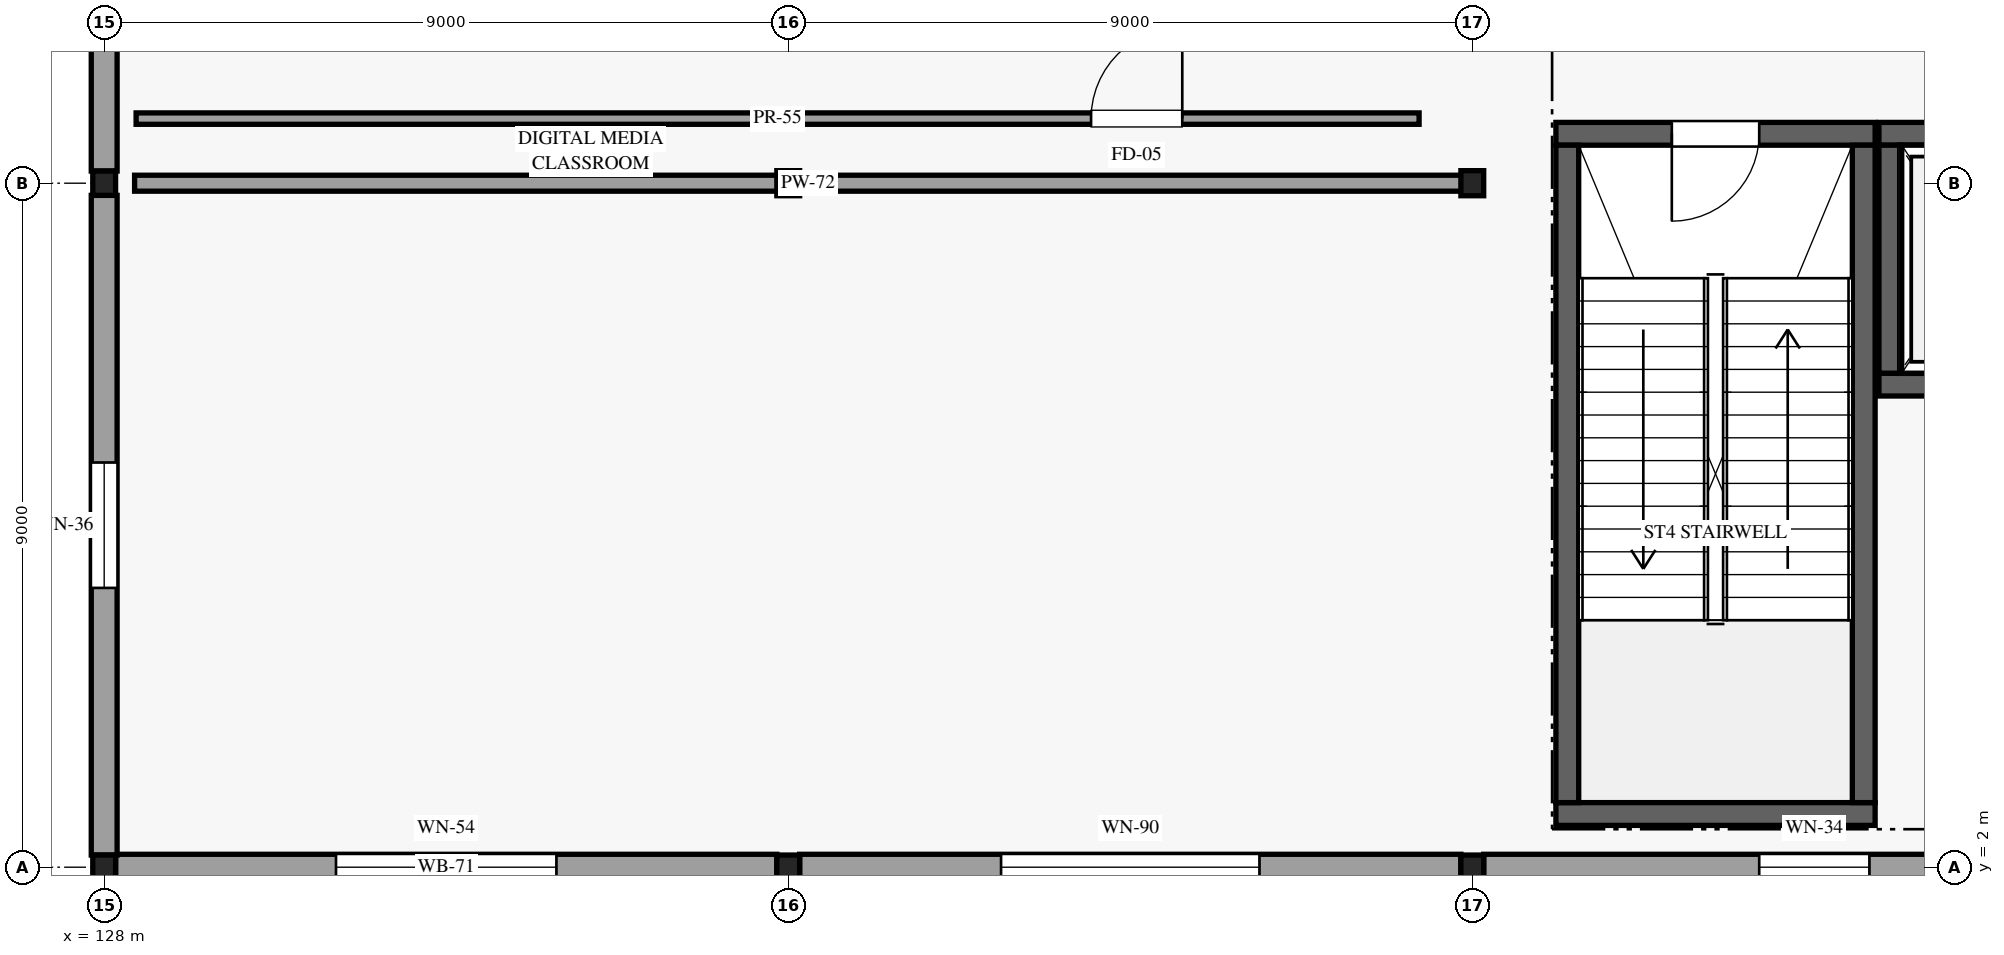
"""IFC4 building model, lengths in metres.
Left out: names, types, materials, properties, quantities, classifications, styles, units other than length and angle.
Written with IfcOpenShell. Run it as: python <this file> out.ifc"""

import sys

from ifc_helpers import new_model, si_unit, direction, frame, frame_2d, origin, origin_2d, place, context, subcontext, project, spatial, rectangle, i_section, extrude, element, fill, save


model = new_model("IFC4")
c1 = context("Model", 3, precision=1e-05, world=origin(), true_north=direction((0.0, 1.0)))
c2 = subcontext(c1, "Body", "Model", "MODEL_VIEW")
j1 = project(units=[si_unit("LENGTHUNIT", "METRE"), si_unit("PLANEANGLEUNIT", "RADIAN")], contexts=[c1])
p1 = place(None, origin())
s1 = spatial("IfcSite", under=j1, at=p1, CompositionType="ELEMENT")
p2 = place(p1, origin())
s2 = spatial("IfcBuilding", under=s1, at=p2, CompositionType="ELEMENT")
p3 = place(p2, frame((0.0, 0.0, 5.4)))
s3 = spatial("IfcBuildingStorey", under=s2, at=p3, CompositionType="ELEMENT", Elevation=5.4)
for number, where, z_axis, x_axis in (
    (1, (128.0, 2.0, 0.0), (0.0, 0.0, 1.0), (1.0, 0.0, 0.0)),
    (2, (128.0, 11.0, 0.0), (0.0, 0.0, 1.0), (1.0, 0.0, 0.0)),
    (3, (137.0, 2.0, 0.0), (0.0, 0.0, 1.0), (1.0, 0.0, 0.0)),
):
    element("IfcColumn", number, at=place(p3, frame(where, z_axis=z_axis, x_axis=x_axis)), inside=s3, PredefinedType="COLUMN", context=c2, shape_type="SweptSolid", body=[
        extrude(i_section(OverallWidth=0.3, OverallDepth=0.32, WebThickness=0.011, FlangeThickness=0.021, FilletRadius=0.027, at=origin_2d()), origin(), (0.0, 0.0, 1.0), 4.8),
    ])
p4 = place(p3, frame((137.0, 11.0, 0.0), z_axis=(0.0, 0.0, 1.0), x_axis=(1.0, 0.0, 0.0)))
e4 = element("IfcColumn", 4, at=p4, inside=s3, PredefinedType="COLUMN", context=c2, shape_type="SweptSolid", body=[
    extrude(i_section(OverallWidth=0.3, OverallDepth=0.33, WebThickness=0.01, FlangeThickness=0.017, FilletRadius=0.027, at=origin_2d()), origin(), (0.0, 0.0, 1.0), 4.8),
])
p5 = place(p3, frame((146.0, 2.0, 0.0), z_axis=(0.0, 0.0, 1.0), x_axis=(1.0, 0.0, 0.0)))
e5 = element("IfcColumn", 5, at=p5, inside=s3, PredefinedType="COLUMN", context=c2, shape_type="SweptSolid", body=[
    extrude(i_section(OverallWidth=0.3, OverallDepth=0.32, WebThickness=0.011, FlangeThickness=0.021, FilletRadius=0.027, at=origin_2d()), origin(), (0.0, 0.0, 1.0), 4.8),
])
p6 = place(p3, frame((146.0, 11.0, 0.0), z_axis=(0.0, 0.0, 1.0), x_axis=(1.0, 0.0, 0.0)))
e6 = element("IfcColumn", 6, at=p6, inside=s3, PredefinedType="COLUMN", context=c2, shape_type="SweptSolid", body=[
    extrude(i_section(OverallWidth=0.3, OverallDepth=0.33, WebThickness=0.01, FlangeThickness=0.017, FilletRadius=0.027, at=origin_2d()), origin(), (0.0, 0.0, 1.0), 4.8),
])
p7 = place(p3, frame((128.15, 2.0, 0.0), z_axis=(0.0, 0.0, 1.0), x_axis=(1.0, 0.0, 0.0)))
e7 = element("IfcWall", 7, at=p7, inside=s3, PredefinedType="STANDARD", context=c2, shape_type="SweptSolid", body=[
    extrude(rectangle(XDim=8.7, YDim=0.34, at=frame_2d((4.35, 0.0))), origin(), (0.0, 0.0, 1.0), 3.985),
])
p8 = place(p7, frame((5.8, 0.0, 0.85), z_axis=(0.0, 0.0, 1.0), x_axis=(-1.0, 0.0, 0.0)))
e8 = element("IfcOpeningElement", 8, at=p8, cuts=e7, PredefinedType="OPENING", context=c2, shape_type="SweptSolid", body=[
    extrude(rectangle(XDim=2.9, YDim=2.25, at=frame_2d((1.45, 1.125))), frame((0.0, 0.18, 0.0), z_axis=(0.0, -1.0, 0.0), x_axis=(1.0, 0.0, 0.0)), (0.0, 0.0, 1.0), 0.36),
])
p9 = place(p3, frame((137.15, 2.0, 0.0), z_axis=(0.0, 0.0, 1.0), x_axis=(1.0, 0.0, 0.0)))
e9 = element("IfcWall", 9, at=p9, inside=s3, PredefinedType="STANDARD", context=c2, shape_type="SweptSolid", body=[
    extrude(rectangle(XDim=8.7, YDim=0.34, at=frame_2d((4.35, 0.0))), origin(), (0.0, 0.0, 1.0), 3.985),
])
p10 = place(p9, frame((6.05, 0.0, 0.85), z_axis=(0.0, 0.0, 1.0), x_axis=(-1.0, 0.0, 0.0)))
e10 = element("IfcOpeningElement", 10, at=p10, cuts=e9, PredefinedType="OPENING", context=c2, shape_type="SweptSolid", body=[
    extrude(rectangle(XDim=3.4, YDim=2.4, at=frame_2d((1.7, 1.2))), frame((0.0, 0.18, 0.0), z_axis=(0.0, -1.0, 0.0), x_axis=(1.0, 0.0, 0.0)), (0.0, 0.0, 1.0), 0.36),
])
p11 = place(p3, frame((146.15, 2.0, 0.0), z_axis=(0.0, 0.0, 1.0), x_axis=(1.0, 0.0, 0.0)))
e11 = element("IfcWall", 11, at=p11, inside=s3, PredefinedType="STANDARD", context=c2, shape_type="SweptSolid", body=[
    extrude(rectangle(XDim=8.7, YDim=0.34, at=frame_2d((4.35, 0.0))), origin(), (0.0, 0.0, 1.0), 3.985),
])
p12 = place(p11, frame((5.075, 0.0, 0.85), z_axis=(0.0, 0.0, 1.0), x_axis=(-1.0, 0.0, 0.0)))
e12 = element("IfcOpeningElement", 12, at=p12, cuts=e11, PredefinedType="OPENING", context=c2, shape_type="SweptSolid", body=[
    extrude(rectangle(XDim=1.45, YDim=1.85, at=frame_2d((0.725, 0.925))), frame((0.0, 0.18, 0.0), z_axis=(0.0, -1.0, 0.0), x_axis=(1.0, 0.0, 0.0)), (0.0, 0.0, 1.0), 0.36),
])
p13 = place(p3, frame((128.0, 2.16, 0.0), z_axis=(0.0, 0.0, 1.0), x_axis=(0.0, 1.0, 0.0)))
e13 = element("IfcWall", 13, at=p13, inside=s3, PredefinedType="STANDARD", context=c2, shape_type="SweptSolid", body=[
    extrude(rectangle(XDim=8.68, YDim=0.34, at=frame_2d((4.34, 0.0))), origin(), (0.0, 0.0, 1.0), 3.985),
])
p14 = place(p13, frame((3.515, 0.0, 0.85)))
e14 = element("IfcOpeningElement", 14, at=p14, cuts=e13, PredefinedType="OPENING", context=c2, shape_type="SweptSolid", body=[
    extrude(rectangle(XDim=1.65, YDim=2.0, at=frame_2d((0.825, 1.0))), frame((0.0, 0.18, 0.0), z_axis=(0.0, -1.0, 0.0), x_axis=(1.0, 0.0, 0.0)), (0.0, 0.0, 1.0), 0.36),
])
p15 = place(p3, frame((128.0, 11.16, 0.0), z_axis=(0.0, 0.0, 1.0), x_axis=(0.0, 1.0, 0.0)))
e15 = element("IfcWall", 15, at=p15, inside=s3, PredefinedType="STANDARD", context=c2, shape_type="SweptSolid", body=[
    extrude(rectangle(XDim=8.68, YDim=0.34, at=frame_2d((4.34, 0.0))), origin(), (0.0, 0.0, 1.0), 3.985),
])
p16 = place(p15, frame((3.415, 0.0, 0.85)))
e16 = element("IfcOpeningElement", 16, at=p16, cuts=e15, PredefinedType="OPENING", context=c2, shape_type="SweptSolid", body=[
    extrude(rectangle(XDim=1.85, YDim=2.1, at=frame_2d((0.925, 1.05))), frame((0.0, 0.18, 0.0), z_axis=(0.0, -1.0, 0.0), x_axis=(1.0, 0.0, 0.0)), (0.0, 0.0, 1.0), 0.36),
])
p17 = place(p3, frame((147.1, 11.65, 0.0), z_axis=(0.0, 0.0, 1.0), x_axis=(1.0, 0.0, 0.0)))
e17 = element("IfcWall", 17, at=p17, inside=s3, PredefinedType="SHEAR", context=c2, shape_type="SweptSolid", body=[
    extrude(rectangle(XDim=4.2, YDim=0.3, at=frame_2d((2.1, 0.0))), origin(), (0.0, 0.0, 1.0), 4.56),
])
p18 = place(p17, frame((2.675, 0.0, 0.0), z_axis=(0.0, 0.0, 1.0), x_axis=(-1.0, 0.0, 0.0)))
e18 = element("IfcOpeningElement", 18, at=p18, cuts=e17, PredefinedType="OPENING", context=c2, shape_type="SweptSolid", body=[
    extrude(rectangle(XDim=1.15, YDim=2.2, at=frame_2d((0.575, 1.1))), frame((0.0, 0.16, 0.0), z_axis=(0.0, -1.0, 0.0), x_axis=(1.0, 0.0, 0.0)), (0.0, 0.0, 1.0), 0.32),
])
p19 = place(p3, frame((147.1, 2.7, 0.0), z_axis=(0.0, 0.0, 1.0), x_axis=(1.0, 0.0, 0.0)))
e19 = element("IfcWall", 19, at=p19, inside=s3, PredefinedType="SHEAR", context=c2, shape_type="SweptSolid", body=[
    extrude(rectangle(XDim=4.2, YDim=0.3, at=frame_2d((2.1, 0.0))), origin(), (0.0, 0.0, 1.0), 4.56),
])
for number, where, z_axis, x_axis in (
    (20, (147.25, 2.85, 0.0), (0.0, 0.0, 1.0), (0.0, 1.0, 0.0)),
    (21, (151.15, 2.85, 0.0), (0.0, 0.0, 1.0), (0.0, 1.0, 0.0)),
):
    element("IfcWall", number, at=place(p3, frame(where, z_axis=z_axis, x_axis=x_axis)), inside=s3, PredefinedType="SHEAR", context=c2, shape_type="SweptSolid", body=[
        extrude(rectangle(XDim=8.65, YDim=0.3, at=frame_2d((4.325, 0.0))), origin(), (0.0, 0.0, 1.0), 4.56),
    ])
p20 = place(p3, frame((151.35, 11.65, 0.0), z_axis=(0.0, 0.0, 1.0), x_axis=(1.0, 0.0, 0.0)))
e22 = element("IfcWall", 22, at=p20, inside=s3, PredefinedType="SHEAR", context=c2, shape_type="SweptSolid", body=[
    extrude(rectangle(XDim=2.6, YDim=0.3, at=frame_2d((1.3, 0.0))), origin(), (0.0, 0.0, 1.0), 4.56),
])
p21 = place(p20, frame((0.75, 0.0, 0.0)))
e23 = element("IfcOpeningElement", 23, at=p21, cuts=e22, PredefinedType="OPENING", context=c2, shape_type="SweptSolid", body=[
    extrude(rectangle(XDim=1.1, YDim=2.2, at=frame_2d((0.55, 1.1))), frame((0.0, 0.16, 0.0), z_axis=(0.0, -1.0, 0.0), x_axis=(1.0, 0.0, 0.0)), (0.0, 0.0, 1.0), 0.32),
])
p22 = place(p3, frame((151.35, 8.35, 0.0), z_axis=(0.0, 0.0, 1.0), x_axis=(1.0, 0.0, 0.0)))
e24 = element("IfcWall", 24, at=p22, inside=s3, PredefinedType="SHEAR", context=c2, shape_type="SweptSolid", body=[
    extrude(rectangle(XDim=2.6, YDim=0.3, at=frame_2d((1.3, 0.0))), origin(), (0.0, 0.0, 1.0), 4.56),
])
p23 = place(p3, frame((151.5, 8.5, 0.0), z_axis=(0.0, 0.0, 1.0), x_axis=(0.0, 1.0, 0.0)))
e25 = element("IfcWall", 25, at=p23, inside=s3, PredefinedType="SHEAR", context=c2, shape_type="SweptSolid", body=[
    extrude(rectangle(XDim=3.0, YDim=0.3, at=frame_2d((1.5, 0.0))), origin(), (0.0, 0.0, 1.0), 4.56),
])
p24 = place(p3, frame((128.4, 11.0, 0.0), z_axis=(0.0, 0.0, 1.0), x_axis=(1.0, 0.0, 0.0)))
e26 = element("IfcWall", 26, at=p24, inside=s3, PredefinedType="PARTITIONING", context=c2, shape_type="SweptSolid", body=[
    extrude(rectangle(XDim=17.72, YDim=0.21, at=frame_2d((8.86, 0.0))), origin(), (0.0, 0.0, 1.0), 3.985),
])
p25 = place(p3, frame((128.42, 11.85, 0.0), z_axis=(0.0, 0.0, 1.0), x_axis=(1.0, 0.0, 0.0)))
e27 = element("IfcWall", 27, at=p25, inside=s3, PredefinedType="PARTITIONING", context=c2, shape_type="SweptSolid", body=[
    extrude(rectangle(XDim=16.88, YDim=0.15, at=frame_2d((8.44, 0.0))), origin(), (0.0, 0.0, 1.0), 3.985),
])
p26 = place(p25, frame((12.564, 0.0, 0.0)))
e28 = element("IfcOpeningElement", 28, at=p26, cuts=e27, PredefinedType="OPENING", context=c2, shape_type="SweptSolid", body=[
    extrude(rectangle(XDim=1.2, YDim=2.3, at=frame_2d((0.6, 1.15))), frame((0.0, 0.085, 0.0), z_axis=(0.0, -1.0, 0.0), x_axis=(1.0, 0.0, 0.0)), (0.0, 0.0, 1.0), 0.17),
])
p27 = place(p8, origin())
e29 = element("IfcWindow", 29, at=p27, inside=s3, PartitioningType="SINGLE_PANEL", PredefinedType="WINDOW", context=c2, shape_type="SweptSolid", body=[
    extrude(rectangle(XDim=2.9, YDim=2.25, at=frame_2d((1.45, 1.125))), frame((0.0, 0.03, 0.0), z_axis=(0.0, -1.0, 0.0), x_axis=(1.0, 0.0, 0.0)), (0.0, 0.0, 1.0), 0.06),
])
fill(e8, e29)
p28 = place(p10, origin())
e30 = element("IfcWindow", 30, at=p28, inside=s3, PartitioningType="SINGLE_PANEL", PredefinedType="WINDOW", context=c2, shape_type="SweptSolid", body=[
    extrude(rectangle(XDim=3.4, YDim=2.4, at=frame_2d((1.7, 1.2))), frame((0.0, 0.03, 0.0), z_axis=(0.0, -1.0, 0.0), x_axis=(1.0, 0.0, 0.0)), (0.0, 0.0, 1.0), 0.06),
])
fill(e10, e30)
p29 = place(p12, origin())
e31 = element("IfcWindow", 31, at=p29, inside=s3, PartitioningType="SINGLE_PANEL", PredefinedType="WINDOW", context=c2, shape_type="SweptSolid", body=[
    extrude(rectangle(XDim=1.45, YDim=1.85, at=frame_2d((0.725, 0.925))), frame((0.0, 0.03, 0.0), z_axis=(0.0, -1.0, 0.0), x_axis=(1.0, 0.0, 0.0)), (0.0, 0.0, 1.0), 0.06),
])
fill(e12, e31)
p30 = place(p14, origin())
e32 = element("IfcWindow", 32, at=p30, inside=s3, PartitioningType="SINGLE_PANEL", PredefinedType="WINDOW", context=c2, shape_type="SweptSolid", body=[
    extrude(rectangle(XDim=1.65, YDim=2.0, at=frame_2d((0.825, 1.0))), frame((0.0, 0.03, 0.0), z_axis=(0.0, -1.0, 0.0), x_axis=(1.0, 0.0, 0.0)), (0.0, 0.0, 1.0), 0.06),
])
fill(e14, e32)
p31 = place(p18, origin())
e33 = element("IfcDoor", 33, at=p31, inside=s3, OperationType="SINGLE_SWING_RIGHT", PredefinedType="DOOR", context=c2, shape_type="SweptSolid", body=[
    extrude(rectangle(XDim=1.15, YDim=2.2, at=frame_2d((0.575, 1.1))), frame((0.0, 0.025, 0.0), z_axis=(0.0, -1.0, 0.0), x_axis=(1.0, 0.0, 0.0)), (0.0, 0.0, 1.0), 0.05),
])
fill(e18, e33)
p32 = place(p26, origin())
e34 = element("IfcDoor", 34, at=p32, inside=s3, OperationType="SINGLE_SWING_RIGHT", PredefinedType="DOOR", context=c2, shape_type="SweptSolid", body=[
    extrude(rectangle(XDim=1.2, YDim=2.3, at=frame_2d((0.6, 1.15))), frame((0.0, 0.025, 0.0), z_axis=(0.0, -1.0, 0.0), x_axis=(1.0, 0.0, 0.0)), (0.0, 0.0, 1.0), 0.05),
])
fill(e28, e34)
save(model, sys.argv[1])
